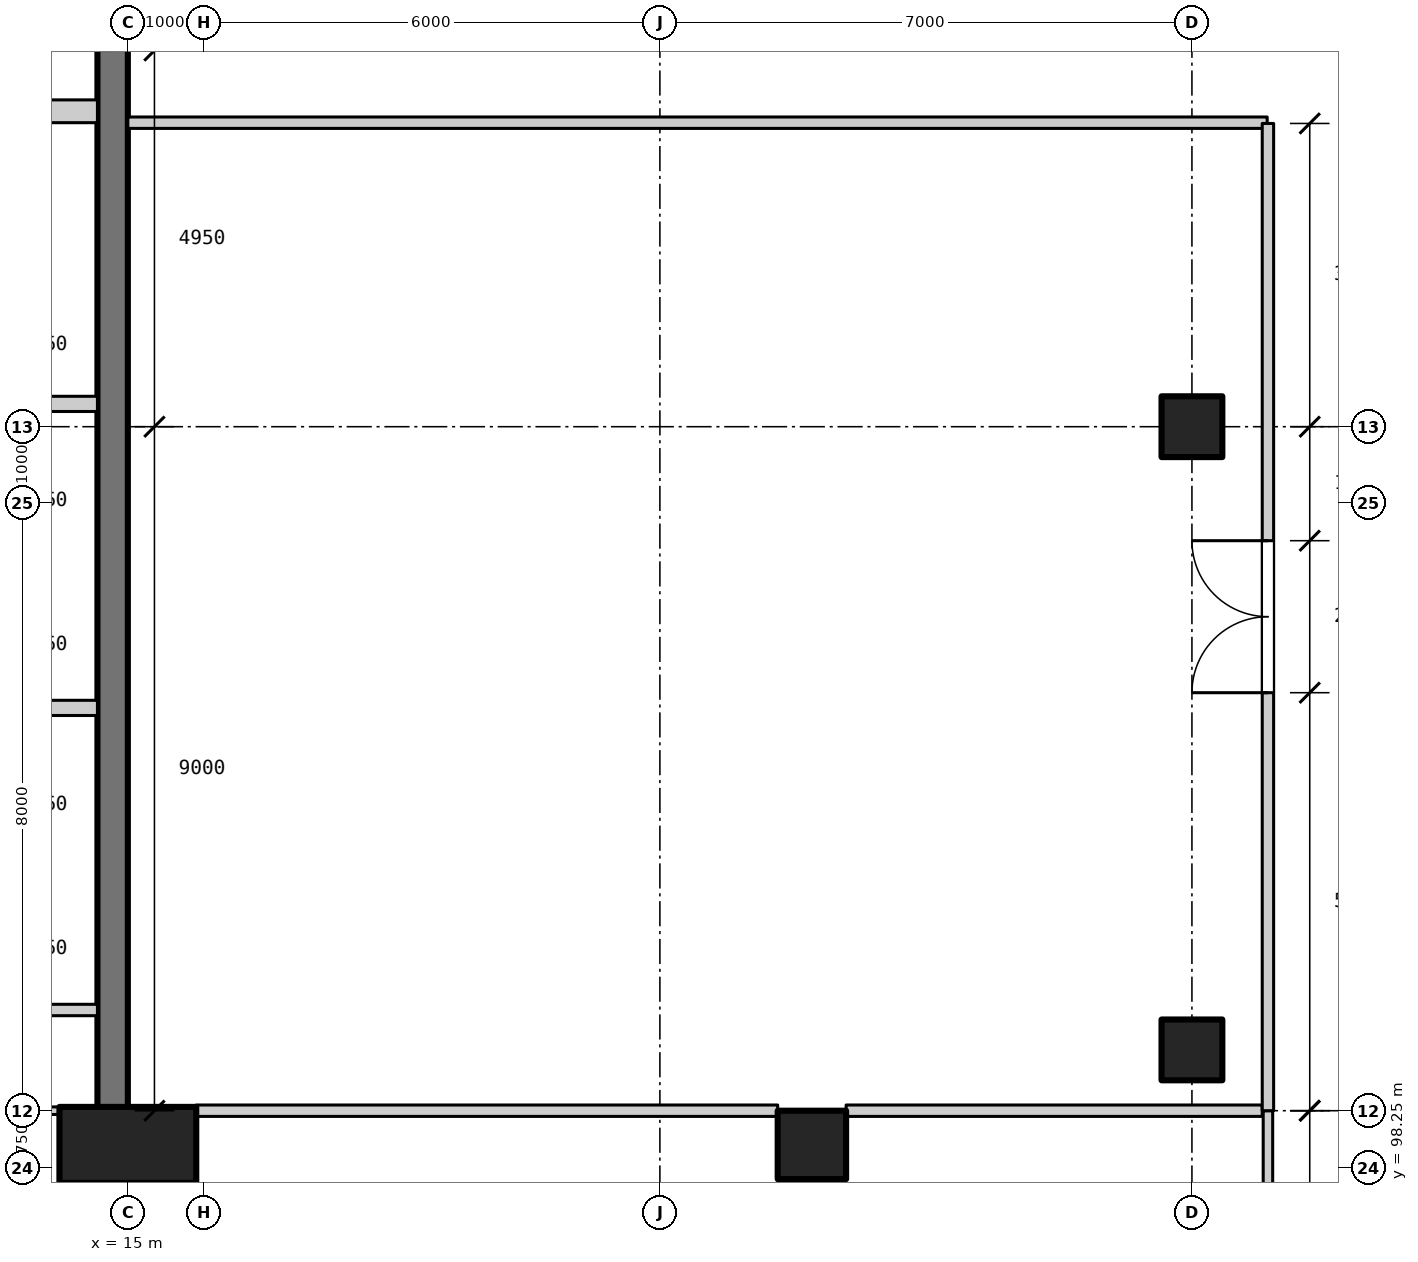
"""IFC4 building model, lengths in metres.
Left out: names, types, materials, properties, quantities, classifications, styles, units other than length and angle.
Written with IfcOpenShell. Run it as: python <this file> out.ifc"""

import sys

from ifc_helpers import new_model, si_unit, direction, frame, frame_2d, origin, origin_2d, place, context, subcontext, project, spatial, rectangle, extrude, element, fill, save


model = new_model("IFC4")
c1 = context("Model", 3, precision=1e-05, world=origin(), true_north=direction((0.0, 1.0)))
c2 = subcontext(c1, "Body", "Model", "MODEL_VIEW")
j1 = project(units=[si_unit("LENGTHUNIT", "METRE"), si_unit("PLANEANGLEUNIT", "RADIAN")], contexts=[c1])
p1 = place(None, origin())
s1 = spatial("IfcSite", under=j1, at=p1, CompositionType="ELEMENT")
p2 = place(p1, origin())
s2 = spatial("IfcBuilding", under=s1, at=p2, CompositionType="ELEMENT")
p3 = place(p2, frame((0.0, 0.0, -10.0)))
s3 = spatial("IfcBuildingStorey", under=s2, at=p3, CompositionType="ELEMENT", Elevation=-10.0)
p4 = place(p3, frame((24.0, 98.55, -1.4), z_axis=(0.0, 0.0, 1.0), x_axis=(1.0, 0.0, 0.0)))
e1 = element("IfcColumn", 1, at=p4, inside=s3, PredefinedType="COLUMN", context=c2, shape_type="SweptSolid", body=[
    extrude(rectangle(XDim=0.9, YDim=0.9, at=origin_2d()), origin(), (0.0, 0.0, 1.0), 6.4),
])
for number, where, z_axis, x_axis in (
    (2, (29.0, 99.8, -1.4), (0.0, 0.0, 1.0), (1.0, 0.0, 0.0)),
    (3, (29.0, 108.0, -1.4), (0.0, 0.0, 1.0), (1.0, 0.0, 0.0)),
):
    element("IfcColumn", number, at=place(p3, frame(where, z_axis=z_axis, x_axis=x_axis)), inside=s3, PredefinedType="COLUMN", context=c2, shape_type="SweptSolid", body=[
        extrude(rectangle(XDim=0.8, YDim=0.8, at=origin_2d()), origin(), (0.0, 0.0, 1.0), 6.4),
    ])
p5 = place(p3, frame((14.8, 99.0, -1.4), z_axis=(0.0, 0.0, 1.0), x_axis=(0.0, 1.0, 0.0)))
e4 = element("IfcWall", 4, at=p5, inside=s3, PredefinedType="SHEAR", context=c2, shape_type="SweptSolid", body=[
    extrude(rectangle(XDim=26.6, YDim=0.4, at=frame_2d((13.3, 0.0))), origin(), (0.0, 0.0, 1.0), 6.4),
])
p6 = place(p5, frame((13.95, 0.0, 1.4)))
e5 = element("IfcOpeningElement", 5, at=p6, cuts=e4, PredefinedType="OPENING", context=c2, shape_type="SweptSolid", body=[
    extrude(rectangle(XDim=1.4, YDim=2.4, at=frame_2d((0.7, 1.2))), frame((0.0, 0.21, 0.0), z_axis=(0.0, -1.0, 0.0), x_axis=(1.0, 0.0, 0.0)), (0.0, 0.0, 1.0), 0.42),
])
p7 = place(p3, frame((15.0, 98.55, -1.4), z_axis=(0.0, 0.0, 1.0), x_axis=(1.0, 0.0, 0.0)))
e6 = element("IfcColumn", 6, at=p7, inside=s3, PredefinedType="COLUMN", context=c2, shape_type="SweptSolid", body=[
    extrude(rectangle(XDim=1.8, YDim=1.0, at=origin_2d()), origin(), (0.0, 0.0, 1.0), 6.4),
])
p8 = place(p3, frame((12.65, 100.325, 0.0), z_axis=(0.0, 0.0, 1.0), x_axis=(1.0, 0.0, 0.0)))
e7 = element("IfcWall", 7, at=p8, inside=s3, PredefinedType="PARTITIONING", context=c2, shape_type="SweptSolid", body=[
    extrude(rectangle(XDim=1.95, YDim=0.15, at=frame_2d((0.975, 0.0))), origin(), (0.0, 0.0, 1.0), 4.75),
])
for number, where, z_axis, x_axis in (
    (8, (12.65, 104.3, 0.0), (0.0, 0.0, 1.0), (1.0, 0.0, 0.0)),
    (9, (12.65, 108.3, 0.0), (0.0, 0.0, 1.0), (1.0, 0.0, 0.0)),
):
    element("IfcWall", number, at=place(p3, frame(where, z_axis=z_axis, x_axis=x_axis)), inside=s3, PredefinedType="PARTITIONING", context=c2, shape_type="SweptSolid", body=[
        extrude(rectangle(XDim=1.95, YDim=0.2, at=frame_2d((0.975, 0.0))), origin(), (0.0, 0.0, 1.0), 4.75),
    ])
p9 = place(p3, frame((12.65, 112.15, 0.0), z_axis=(0.0, 0.0, 1.0), x_axis=(1.0, 0.0, 0.0)))
e10 = element("IfcWall", 10, at=p9, inside=s3, PredefinedType="PARTITIONING", context=c2, shape_type="SweptSolid", body=[
    extrude(rectangle(XDim=1.95, YDim=0.3, at=frame_2d((0.975, 0.0))), origin(), (0.0, 0.0, 1.0), 4.75),
])
p10 = place(p3, frame((12.712, 99.0, 0.0), z_axis=(0.0, 0.0, 1.0), x_axis=(1.0, 0.0, 0.0)))
e11 = element("IfcWall", 11, at=p10, inside=s3, PredefinedType="PARTITIONING", context=c2, shape_type="SweptSolid", body=[
    extrude(rectangle(XDim=1.388, YDim=0.1, at=frame_2d((0.694, 0.0))), origin(), (0.0, 0.0, 1.0), 4.75),
])
p11 = place(p3, frame((15.9, 99.0, 0.0), z_axis=(0.0, 0.0, 1.0), x_axis=(1.0, 0.0, 0.0)))
e12 = element("IfcWall", 12, at=p11, inside=s3, PredefinedType="PARTITIONING", context=c2, shape_type="SweptSolid", body=[
    extrude(rectangle(XDim=7.65, YDim=0.15, at=frame_2d((3.825, 0.0))), origin(), (0.0, 0.0, 1.0), 4.75),
])
p12 = place(p3, frame((24.45, 99.0, 0.0), z_axis=(0.0, 0.0, 1.0), x_axis=(1.0, 0.0, 0.0)))
e13 = element("IfcWall", 13, at=p12, inside=s3, PredefinedType="PARTITIONING", context=c2, shape_type="SweptSolid", body=[
    extrude(rectangle(XDim=5.475, YDim=0.15, at=frame_2d((2.738, 0.0))), origin(), (0.0, 0.0, 1.0), 4.75),
])
p13 = place(p3, frame((15.0, 112.0, 0.0), z_axis=(0.0, 0.0, 1.0), x_axis=(1.0, 0.0, 0.0)))
e14 = element("IfcWall", 14, at=p13, inside=s3, PredefinedType="PARTITIONING", context=c2, shape_type="SweptSolid", body=[
    extrude(rectangle(XDim=14.99, YDim=0.15, at=frame_2d((7.495, 0.0))), origin(), (0.0, 0.0, 1.0), 4.75),
])
p14 = place(p3, frame((30.0, 85.5, 0.0), z_axis=(0.0, 0.0, 1.0), x_axis=(0.0, 1.0, 0.0)))
e15 = element("IfcWall", 15, at=p14, inside=s3, PredefinedType="PARTITIONING", context=c2, shape_type="SweptSolid", body=[
    extrude(rectangle(XDim=13.5, YDim=0.125, at=frame_2d((6.75, 0.0))), origin(), (0.0, 0.0, 1.0), 4.75),
])
p15 = place(p14, frame((6.15, 0.0, 0.0)))
e16 = element("IfcOpeningElement", 16, at=p15, cuts=e15, PredefinedType="OPENING", context=c2, shape_type="SweptSolid", body=[
    extrude(rectangle(XDim=1.2, YDim=2.1, at=frame_2d((0.6, 1.05))), frame((0.0, 0.073, 0.0), z_axis=(0.0, -1.0, 0.0), x_axis=(1.0, 0.0, 0.0)), (0.0, 0.0, 1.0), 0.145),
])
p16 = place(p3, frame((30.0, 99.0, 0.0), z_axis=(0.0, 0.0, 1.0), x_axis=(0.0, 1.0, 0.0)))
e17 = element("IfcWall", 17, at=p16, inside=s3, PredefinedType="PARTITIONING", context=c2, shape_type="SweptSolid", body=[
    extrude(rectangle(XDim=12.99, YDim=0.15, at=frame_2d((6.495, 0.0))), origin(), (0.0, 0.0, 1.0), 4.75),
])
p17 = place(p16, frame((5.5, 0.0, 0.0)))
e18 = element("IfcOpeningElement", 18, at=p17, cuts=e17, PredefinedType="OPENING", context=c2, shape_type="SweptSolid", body=[
    extrude(rectangle(XDim=2.0, YDim=2.4, at=frame_2d((1.0, 1.2))), frame((0.0, 0.085, 0.0), z_axis=(0.0, -1.0, 0.0), x_axis=(1.0, 0.0, 0.0)), (0.0, 0.0, 1.0), 0.17),
])
p18 = place(p17, origin())
e19 = element("IfcDoor", 19, at=p18, inside=s3, OperationType="DOUBLE_DOOR_SINGLE_SWING", PredefinedType="DOOR", context=c2, shape_type="SweptSolid", body=[
    extrude(rectangle(XDim=2.0, YDim=2.4, at=frame_2d((1.0, 1.2))), frame((0.0, 0.025, 0.0), z_axis=(0.0, -1.0, 0.0), x_axis=(1.0, 0.0, 0.0)), (0.0, 0.0, 1.0), 0.05),
])
fill(e18, e19)
save(model, sys.argv[1])
